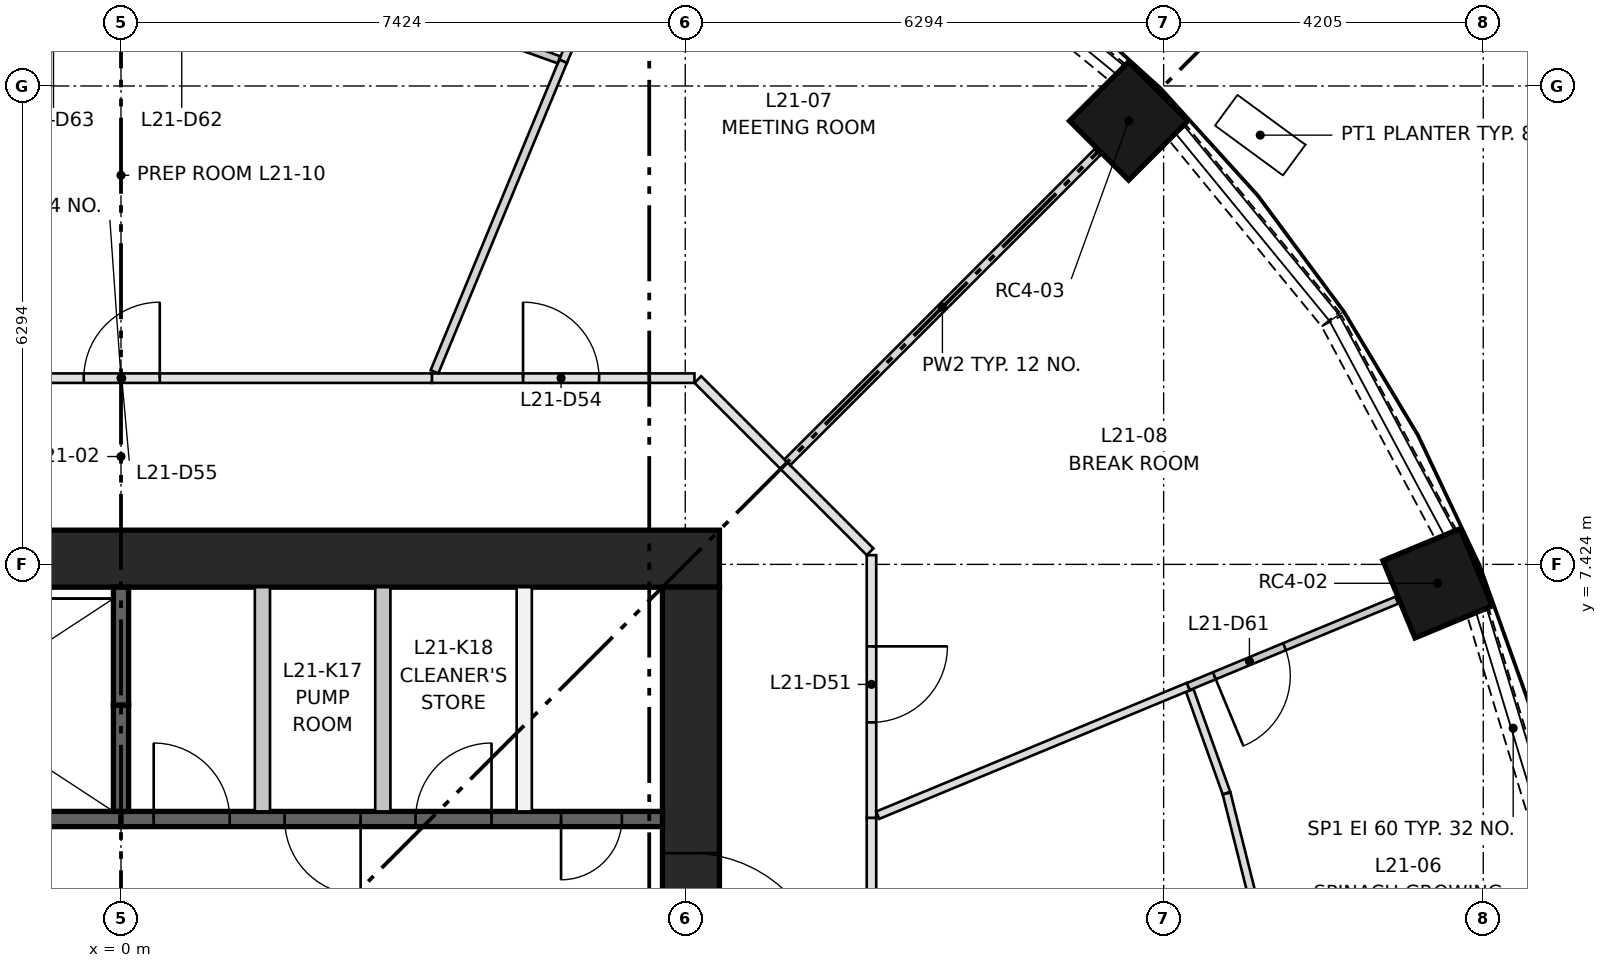
"""IFC4 building model, lengths in metres.
Left out: names, types, materials, properties, quantities, classifications, styles, units other than length and angle.
Written with IfcOpenShell. Run it as: python <this file> out.ifc"""

import sys

from ifc_helpers import new_model, si_unit, direction, frame, frame_2d, origin, origin_2d, place, context, subcontext, project, spatial, rectangle, extrude, element, fill, save


model = new_model("IFC4")
c1 = context("Model", 3, precision=1e-05, world=origin(), true_north=direction((0.0, 1.0)))
c2 = subcontext(c1, "Body", "Model", "MODEL_VIEW")
j1 = project(units=[si_unit("LENGTHUNIT", "METRE"), si_unit("PLANEANGLEUNIT", "RADIAN")], contexts=[c1])
p1 = place(None, origin())
s1 = spatial("IfcSite", under=j1, at=p1, CompositionType="ELEMENT")
p2 = place(p1, origin())
s2 = spatial("IfcBuilding", under=s1, at=p2, CompositionType="ELEMENT")
p3 = place(p2, frame((0.0, 0.0, 83.7)))
s3 = spatial("IfcBuildingStorey", under=s2, at=p3, CompositionType="ELEMENT", Elevation=83.7)
for number, where, z_axis, x_axis in (
    (1, (17.323, 7.175, 0.0), (0.0, 0.0, 1.0), (0.924, 0.383, 0.0)),
    (2, (13.258, 13.258, 0.0), (0.0, 0.0, 1.0), (0.707, 0.707, 0.0)),
):
    element("IfcColumn", number, at=place(p3, frame(where, z_axis=z_axis, x_axis=x_axis)), inside=s3, PredefinedType="COLUMN", context=c2, shape_type="SweptSolid", body=[
        extrude(rectangle(XDim=1.1, YDim=1.1, at=origin_2d()), origin(), (0.0, 0.0, 1.0), 3.65),
    ])
p4 = place(p3, frame((-7.874, 7.499, 0.0), z_axis=(0.0, 0.0, 1.0), x_axis=(1.0, 0.0, 0.0)))
e3 = element("IfcWall", 3, at=p4, inside=s3, PredefinedType="SHEAR", context=c2, shape_type="SweptSolid", body=[
    extrude(rectangle(XDim=15.748, YDim=0.75, at=frame_2d((7.874, 0.0))), origin(), (0.0, 0.0, 1.0), 3.65),
])
p5 = place(p3, frame((7.499, -7.124, 0.0), z_axis=(0.0, 0.0, 1.0), x_axis=(0.0, 1.0, 0.0)))
e4 = element("IfcWall", 4, at=p5, inside=s3, PredefinedType="SHEAR", context=c2, shape_type="SweptSolid", body=[
    extrude(rectangle(XDim=14.248, YDim=0.75, at=frame_2d((7.124, 0.0))), origin(), (0.0, 0.0, 1.0), 3.65),
])
p6 = place(p5, frame((6.624, 0.0, 0.0)))
e5 = element("IfcOpeningElement", 5, at=p6, cuts=e4, PredefinedType="OPENING", context=c2, shape_type="SweptSolid", body=[
    extrude(rectangle(XDim=1.0, YDim=2.1, at=frame_2d((0.5, 1.05))), frame((0.0, 0.385, 0.0), z_axis=(0.0, -1.0, 0.0), x_axis=(1.0, 0.0, 0.0)), (0.0, 0.0, 1.0), 0.77),
])
p7 = place(p5, frame((3.5, 0.0, 0.0)))
e6 = element("IfcOpeningElement", 6, at=p7, cuts=e4, PredefinedType="OPENING", context=c2, shape_type="SweptSolid", body=[
    extrude(rectangle(XDim=1.8, YDim=2.1, at=frame_2d((0.9, 1.05))), frame((0.0, 0.385, 0.0), z_axis=(0.0, -1.0, 0.0), x_axis=(1.0, 0.0, 0.0)), (0.0, 0.0, 1.0), 0.77),
])
p8 = place(p5, frame((8.948, 0.0, 0.0)))
e7 = element("IfcOpeningElement", 7, at=p8, cuts=e4, PredefinedType="OPENING", context=c2, shape_type="SweptSolid", body=[
    extrude(rectangle(XDim=1.8, YDim=2.1, at=frame_2d((0.9, 1.05))), frame((0.0, 0.385, 0.0), z_axis=(0.0, -1.0, 0.0), x_axis=(1.0, 0.0, 0.0)), (0.0, 0.0, 1.0), 0.77),
])
p9 = place(p3, frame((-7.124, 4.074, 0.0), z_axis=(0.0, 0.0, 1.0), x_axis=(1.0, 0.0, 0.0)))
e8 = element("IfcWall", 8, at=p9, inside=s3, PredefinedType="SHEAR", context=c2, shape_type="SweptSolid", body=[
    extrude(rectangle(XDim=7.124, YDim=0.2, at=frame_2d((3.562, 0.0))), origin(), (0.0, 0.0, 1.0), 3.3),
])
p10 = place(p3, frame((0.0, 4.074, 0.0), z_axis=(0.0, 0.0, 1.0), x_axis=(1.0, 0.0, 0.0)))
e9 = element("IfcWall", 9, at=p10, inside=s3, PredefinedType="SHEAR", context=c2, shape_type="SweptSolid", body=[
    extrude(rectangle(XDim=7.124, YDim=0.2, at=frame_2d((3.562, 0.0))), origin(), (0.0, 0.0, 1.0), 3.3),
])
p11 = place(p10, frame((0.43, 0.0, 0.0)))
e10 = element("IfcOpeningElement", 10, at=p11, cuts=e9, PredefinedType="OPENING", context=c2, shape_type="SweptSolid", body=[
    extrude(rectangle(XDim=1.0, YDim=2.1, at=frame_2d((0.5, 1.05))), frame((0.0, 0.11, 0.0), z_axis=(0.0, -1.0, 0.0), x_axis=(1.0, 0.0, 0.0)), (0.0, 0.0, 1.0), 0.22),
])
p12 = place(p10, frame((2.153, 0.0, 0.0)))
e11 = element("IfcOpeningElement", 11, at=p12, cuts=e9, PredefinedType="OPENING", context=c2, shape_type="SweptSolid", body=[
    extrude(rectangle(XDim=1.0, YDim=2.1, at=frame_2d((0.5, 1.05))), frame((0.0, 0.11, 0.0), z_axis=(0.0, -1.0, 0.0), x_axis=(1.0, 0.0, 0.0)), (0.0, 0.0, 1.0), 0.22),
])
p13 = place(p10, frame((3.875, 0.0, 0.0)))
e12 = element("IfcOpeningElement", 12, at=p13, cuts=e9, PredefinedType="OPENING", context=c2, shape_type="SweptSolid", body=[
    extrude(rectangle(XDim=1.0, YDim=2.1, at=frame_2d((0.5, 1.05))), frame((0.0, 0.11, 0.0), z_axis=(0.0, -1.0, 0.0), x_axis=(1.0, 0.0, 0.0)), (0.0, 0.0, 1.0), 0.22),
])
p14 = place(p10, frame((5.79, 0.0, 0.0)))
e13 = element("IfcOpeningElement", 13, at=p14, cuts=e9, PredefinedType="OPENING", context=c2, shape_type="SweptSolid", body=[
    extrude(rectangle(XDim=0.8, YDim=2.1, at=frame_2d((0.4, 1.05))), frame((0.0, 0.11, 0.0), z_axis=(0.0, -1.0, 0.0), x_axis=(1.0, 0.0, 0.0)), (0.0, 0.0, 1.0), 0.22),
])
p15 = place(p3, frame((0.0, 4.174, 0.0), z_axis=(0.0, 0.0, 1.0), x_axis=(0.0, 1.0, 0.0)))
e14 = element("IfcWall", 14, at=p15, inside=s3, PredefinedType="SHEAR", context=c2, shape_type="SweptSolid", body=[
    extrude(rectangle(XDim=1.4, YDim=0.2, at=frame_2d((0.7, 0.0))), origin(), (0.0, 0.0, 1.0), 3.3),
])
p16 = place(p3, frame((0.0, 5.574, 0.0), z_axis=(0.0, 0.0, 1.0), x_axis=(0.0, 1.0, 0.0)))
e15 = element("IfcWall", 15, at=p16, inside=s3, PredefinedType="SHEAR", context=c2, shape_type="SweptSolid", body=[
    extrude(rectangle(XDim=1.55, YDim=0.2, at=frame_2d((0.775, 0.0))), origin(), (0.0, 0.0, 1.0), 3.3),
])
for number, where, z_axis, x_axis in (
    (16, (1.861, 4.174, 0.0), (0.0, 0.0, 1.0), (0.0, 1.0, 0.0)),
    (17, (3.445, 4.174, 0.0), (0.0, 0.0, 1.0), (0.0, 1.0, 0.0)),
    (18, (5.305, 4.174, 0.0), (0.0, 0.0, 1.0), (0.0, 1.0, 0.0)),
):
    element("IfcWall", number, at=place(p3, frame(where, z_axis=z_axis, x_axis=x_axis)), inside=s3, PredefinedType="PARTITIONING", context=c2, shape_type="SweptSolid", body=[
        extrude(rectangle(XDim=2.95, YDim=0.2, at=frame_2d((1.475, 0.0))), origin(), (0.0, 0.0, 1.0), 3.3),
    ])
p17 = place(p3, frame((18.778, 3.75, 0.0), z_axis=(0.0, 0.0, 1.0), x_axis=(-0.290325591482, 0.956927923582, 0.0)))
e19 = element("IfcWall", 19, at=p17, inside=s3, PredefinedType="SOLIDWALL", context=c2, shape_type="SweptSolid", body=[
    extrude(rectangle(XDim=3.173, YDim=0.3, at=frame_2d((1.586, 0.0))), origin(), (0.0, 0.0, 1.0), 0.9),
])
p18 = place(p3, frame((17.425, 7.828, 0.0), z_axis=(0.0, 0.0, 1.0), x_axis=(-0.471458802606, 0.88188808669, 0.0)))
e20 = element("IfcWall", 20, at=p18, inside=s3, PredefinedType="SOLIDWALL", context=c2, shape_type="SweptSolid", body=[
    extrude(rectangle(XDim=3.172, YDim=0.3, at=frame_2d((1.586, 0.0))), origin(), (0.0, 0.0, 1.0), 0.9),
])
for number, where, z_axis, x_axis in (
    (21, (15.913, 10.651, 0.0), (0.0, 0.0, 1.0), (-0.634, 0.773, 0.0)),
    (22, (13.104, 13.9, 0.0), (0.0, 0.0, 1.0), (-0.773, 0.634, 0.0)),
):
    element("IfcWall", number, at=place(p3, frame(where, z_axis=z_axis, x_axis=x_axis)), inside=s3, PredefinedType="SOLIDWALL", context=c2, shape_type="SweptSolid", body=[
        extrude(rectangle(XDim=3.173, YDim=0.3, at=frame_2d((1.586, 0.0))), origin(), (0.0, 0.0, 1.0), 0.9),
    ])
p19 = place(p3, frame((9.874, 4.09, 0.0), z_axis=(0.0, 0.0, 1.0), x_axis=(0.0, -1.0, 0.0)))
e23 = element("IfcWall", 23, at=p19, inside=s3, PredefinedType="PARTITIONING", context=c2, shape_type="SweptSolid", body=[
    extrude(rectangle(XDim=4.09, YDim=0.125, at=frame_2d((2.045, 0.0))), origin(), (0.0, 0.0, 1.0), 3.3),
])
p20 = place(p19, frame((1.5, 0.0, 0.0)))
e24 = element("IfcOpeningElement", 24, at=p20, cuts=e23, PredefinedType="OPENING", context=c2, shape_type="SweptSolid", body=[
    extrude(rectangle(XDim=1.0, YDim=2.1, at=frame_2d((0.5, 1.05))), frame((0.0, 0.073, 0.0), z_axis=(0.0, -1.0, 0.0), x_axis=(1.0, 0.0, 0.0)), (0.0, 0.0, 1.0), 0.145),
])
p21 = place(p3, frame((8.722, 8.722, 0.0), z_axis=(0.0, 0.0, 1.0), x_axis=(0.70718294931, -0.707030604857, 0.0)))
e25 = element("IfcWall", 25, at=p21, inside=s3, PredefinedType="PARTITIONING", context=c2, shape_type="SweptSolid", body=[
    extrude(rectangle(XDim=1.603, YDim=0.125, at=frame_2d((0.801, 0.0))), origin(), (0.0, 0.0, 1.0), 3.3),
])
p22 = place(p3, frame((9.874, 7.545, 0.0), z_axis=(0.0, 0.0, 1.0), x_axis=(0.0, -1.0, 0.0)))
e26 = element("IfcWall", 26, at=p22, inside=s3, PredefinedType="PARTITIONING", context=c2, shape_type="SweptSolid", body=[
    extrude(rectangle(XDim=3.455, YDim=0.125, at=frame_2d((1.728, 0.0))), origin(), (0.0, 0.0, 1.0), 3.3),
])
p23 = place(p22, frame((1.2, 0.0, 0.0)))
e27 = element("IfcOpeningElement", 27, at=p23, cuts=e26, PredefinedType="OPENING", context=c2, shape_type="SweptSolid", body=[
    extrude(rectangle(XDim=1.0, YDim=2.1, at=frame_2d((0.5, 1.05))), frame((0.0, 0.073, 0.0), z_axis=(0.0, -1.0, 0.0), x_axis=(1.0, 0.0, 0.0)), (0.0, 0.0, 1.0), 0.145),
])
p24 = place(p3, frame((4.09, 9.874, 0.0), z_axis=(0.0, 0.0, 1.0), x_axis=(1.0, 0.0, 0.0)))
e28 = element("IfcWall", 28, at=p24, inside=s3, PredefinedType="PARTITIONING", context=c2, shape_type="SweptSolid", body=[
    extrude(rectangle(XDim=3.455, YDim=0.125, at=frame_2d((1.728, 0.0))), origin(), (0.0, 0.0, 1.0), 3.3),
])
p25 = place(p24, frame((1.2, 0.0, 0.0)))
e29 = element("IfcOpeningElement", 29, at=p25, cuts=e28, PredefinedType="OPENING", context=c2, shape_type="SweptSolid", body=[
    extrude(rectangle(XDim=1.0, YDim=2.1, at=frame_2d((0.5, 1.05))), frame((0.0, 0.073, 0.0), z_axis=(0.0, -1.0, 0.0), x_axis=(1.0, 0.0, 0.0)), (0.0, 0.0, 1.0), 0.145),
])
p26 = place(p3, frame((7.589, 9.856, 0.0), z_axis=(0.0, 0.0, 1.0), x_axis=(0.707030604857, -0.70718294931, 0.0)))
e30 = element("IfcWall", 30, at=p26, inside=s3, PredefinedType="PARTITIONING", context=c2, shape_type="SweptSolid", body=[
    extrude(rectangle(XDim=1.603, YDim=0.125, at=frame_2d((0.801, 0.0))), origin(), (0.0, 0.0, 1.0), 3.3),
])
p27 = place(p3, frame((-4.09, 9.874, 0.0), z_axis=(0.0, 0.0, 1.0), x_axis=(1.0, 0.0, 0.0)))
e31 = element("IfcWall", 31, at=p27, inside=s3, PredefinedType="PARTITIONING", context=c2, shape_type="SweptSolid", body=[
    extrude(rectangle(XDim=8.18, YDim=0.125, at=frame_2d((4.09, 0.0))), origin(), (0.0, 0.0, 1.0), 3.3),
])
p28 = place(p27, frame((3.6, 0.0, 0.0)))
e32 = element("IfcOpeningElement", 32, at=p28, cuts=e31, PredefinedType="OPENING", context=c2, shape_type="SweptSolid", body=[
    extrude(rectangle(XDim=1.0, YDim=2.1, at=frame_2d((0.5, 1.05))), frame((0.0, 0.073, 0.0), z_axis=(0.0, -1.0, 0.0), x_axis=(1.0, 0.0, 0.0)), (0.0, 0.0, 1.0), 0.145),
])
p29 = place(p3, frame((14.062, 5.765, 0.0), z_axis=(0.0, 0.0, 1.0), x_axis=(0.336940319535, -0.941526006583, 0.0)))
e33 = element("IfcWall", 33, at=p29, inside=s3, PredefinedType="PARTITIONING", context=c2, shape_type="SweptSolid", body=[
    extrude(rectangle(XDim=1.434, YDim=0.105, at=frame_2d((0.717, 0.0))), origin(), (0.0, 0.0, 1.0), 3.3),
])
p30 = place(p3, frame((14.546, 4.41, 0.0), z_axis=(0.0, 0.0, 1.0), x_axis=(0.242922070527, -0.970045806986, 0.0)))
e34 = element("IfcWall", 34, at=p30, inside=s3, PredefinedType="PARTITIONING", context=c2, shape_type="SweptSolid", body=[
    extrude(rectangle(XDim=1.486, YDim=0.105, at=frame_2d((0.743, 0.0))), origin(), (0.0, 0.0, 1.0), 3.3),
])
p31 = place(p3, frame((9.957, 4.124, 0.0), z_axis=(0.0, 0.0, 1.0), x_axis=(0.923862097388, 0.382725521764, 0.0)))
e35 = element("IfcWall", 35, at=p31, inside=s3, PredefinedType="PARTITIONING", context=c2, shape_type="SweptSolid", body=[
    extrude(rectangle(XDim=4.423, YDim=0.105, at=frame_2d((2.211, 0.0))), origin(), (0.0, 0.0, 1.0), 3.3),
])
p32 = place(p3, frame((16.787, 6.953, 0.0), z_axis=(0.0, 0.0, 1.0), x_axis=(-0.923889594764, -0.382659139036, 0.0)))
e36 = element("IfcWall", 36, at=p32, inside=s3, PredefinedType="PARTITIONING", context=c2, shape_type="SweptSolid", body=[
    extrude(rectangle(XDim=2.97, YDim=0.1, at=frame_2d((1.485, 0.0))), origin(), (0.0, 0.0, 1.0), 3.3),
])
p33 = place(p32, frame((1.6, 0.0, 0.0)))
e37 = element("IfcOpeningElement", 37, at=p33, cuts=e36, PredefinedType="OPENING", context=c2, shape_type="SweptSolid", body=[
    extrude(rectangle(XDim=1.0, YDim=2.1, at=frame_2d((0.5, 1.05))), frame((0.0, 0.06, 0.0), z_axis=(0.0, -1.0, 0.0), x_axis=(1.0, 0.0, 0.0)), (0.0, 0.0, 1.0), 0.12),
])
p34 = place(p3, frame((12.848, 12.848, 0.0), z_axis=(0.0, 0.0, 1.0), x_axis=(-0.707106781187, -0.707106781187, 0.0)))
e38 = element("IfcWall", 38, at=p34, inside=s3, PredefinedType="PARTITIONING", context=c2, shape_type="SweptSolid", body=[
    extrude(rectangle(XDim=5.772, YDim=0.11, at=frame_2d((2.886, 0.0))), origin(), (0.0, 0.0, 1.0), 3.3),
])
p35 = place(p3, frame((5.817, 14.043, 0.0), z_axis=(0.0, 0.0, 1.0), x_axis=(0.382659139036, 0.923889594764, 0.0)))
e39 = element("IfcWall", 39, at=p35, inside=s3, PredefinedType="PARTITIONING", context=c2, shape_type="SweptSolid", body=[
    extrude(rectangle(XDim=2.97, YDim=0.11, at=frame_2d((1.485, 0.0))), origin(), (0.0, 0.0, 1.0), 3.3),
])
p36 = place(p3, frame((4.125, 9.958, 0.0), z_axis=(0.0, 0.0, 1.0), x_axis=(0.382709362011, 0.923868791674, 0.0)))
e40 = element("IfcWall", 40, at=p36, inside=s3, PredefinedType="PARTITIONING", context=c2, shape_type="SweptSolid", body=[
    extrude(rectangle(XDim=4.422, YDim=0.11, at=frame_2d((2.211, 0.0))), origin(), (0.0, 0.0, 1.0), 3.3),
])
p37 = place(p3, frame((5.763, 14.062, 0.0), z_axis=(0.0, 0.0, 1.0), x_axis=(-0.941587499657, 0.33676843749, 0.0)))
e41 = element("IfcWall", 41, at=p37, inside=s3, PredefinedType="PARTITIONING", context=c2, shape_type="SweptSolid", body=[
    extrude(rectangle(XDim=1.432, YDim=0.1, at=frame_2d((0.716, 0.0))), origin(), (0.0, 0.0, 1.0), 3.3),
])
p38 = place(p11, origin())
e42 = element("IfcDoor", 42, at=p38, inside=s3, OperationType="SINGLE_SWING_LEFT", PredefinedType="DOOR", context=c2, shape_type="SweptSolid", body=[
    extrude(rectangle(XDim=1.0, YDim=2.1, at=frame_2d((0.5, 1.05))), frame((0.0, 0.025, 0.0), z_axis=(0.0, -1.0, 0.0), x_axis=(1.0, 0.0, 0.0)), (0.0, 0.0, 1.0), 0.05),
])
fill(e10, e42)
p39 = place(p12, frame((1.0, 0.0, 0.0), z_axis=(0.0, 0.0, 1.0), x_axis=(-1.0, 0.0, 0.0)))
e43 = element("IfcDoor", 43, at=p39, inside=s3, OperationType="SINGLE_SWING_RIGHT", PredefinedType="DOOR", context=c2, shape_type="SweptSolid", body=[
    extrude(rectangle(XDim=1.0, YDim=2.1, at=frame_2d((0.5, 1.05))), frame((0.0, 0.025, 0.0), z_axis=(0.0, -1.0, 0.0), x_axis=(1.0, 0.0, 0.0)), (0.0, 0.0, 1.0), 0.05),
])
fill(e11, e43)
p40 = place(p13, origin())
e44 = element("IfcDoor", 44, at=p40, inside=s3, OperationType="SINGLE_SWING_RIGHT", PredefinedType="DOOR", context=c2, shape_type="SweptSolid", body=[
    extrude(rectangle(XDim=1.0, YDim=2.1, at=frame_2d((0.5, 1.05))), frame((0.0, 0.025, 0.0), z_axis=(0.0, -1.0, 0.0), x_axis=(1.0, 0.0, 0.0)), (0.0, 0.0, 1.0), 0.05),
])
fill(e12, e44)
p41 = place(p14, frame((0.8, 0.0, 0.0), z_axis=(0.0, 0.0, 1.0), x_axis=(-1.0, 0.0, 0.0)))
e45 = element("IfcDoor", 45, at=p41, inside=s3, OperationType="SINGLE_SWING_LEFT", PredefinedType="DOOR", context=c2, shape_type="SweptSolid", body=[
    extrude(rectangle(XDim=0.8, YDim=2.1, at=frame_2d((0.4, 1.05))), frame((0.0, 0.025, 0.0), z_axis=(0.0, -1.0, 0.0), x_axis=(1.0, 0.0, 0.0)), (0.0, 0.0, 1.0), 0.05),
])
fill(e13, e45)
p42 = place(p8, frame((1.8, 0.0, 0.0), z_axis=(0.0, 0.0, 1.0), x_axis=(-1.0, 0.0, 0.0)))
e46 = element("IfcDoor", 46, at=p42, inside=s3, OperationType="DOUBLE_DOOR_SINGLE_SWING", PredefinedType="DOOR", context=c2, shape_type="SweptSolid", body=[
    extrude(rectangle(XDim=1.8, YDim=2.1, at=frame_2d((0.9, 1.05))), frame((0.0, 0.025, 0.0), z_axis=(0.0, -1.0, 0.0), x_axis=(1.0, 0.0, 0.0)), (0.0, 0.0, 1.0), 0.05),
])
fill(e7, e46)
p43 = place(p23, origin())
e47 = element("IfcDoor", 47, at=p43, inside=s3, OperationType="SINGLE_SWING_LEFT", PredefinedType="DOOR", context=c2, shape_type="SweptSolid", body=[
    extrude(rectangle(XDim=1.0, YDim=2.1, at=frame_2d((0.5, 1.05))), frame((0.0, 0.025, 0.0), z_axis=(0.0, -1.0, 0.0), x_axis=(1.0, 0.0, 0.0)), (0.0, 0.0, 1.0), 0.05),
])
fill(e27, e47)
p44 = place(p25, origin())
e48 = element("IfcDoor", 48, at=p44, inside=s3, OperationType="SINGLE_SWING_LEFT", PredefinedType="DOOR", context=c2, shape_type="SweptSolid", body=[
    extrude(rectangle(XDim=1.0, YDim=2.1, at=frame_2d((0.5, 1.05))), frame((0.0, 0.025, 0.0), z_axis=(0.0, -1.0, 0.0), x_axis=(1.0, 0.0, 0.0)), (0.0, 0.0, 1.0), 0.05),
])
fill(e29, e48)
p45 = place(p28, origin())
e49 = element("IfcDoor", 49, at=p45, inside=s3, OperationType="SINGLE_SWING_RIGHT", PredefinedType="DOOR", context=c2, shape_type="SweptSolid", body=[
    extrude(rectangle(XDim=1.0, YDim=2.1, at=frame_2d((0.5, 1.05))), frame((0.0, 0.025, 0.0), z_axis=(0.0, -1.0, 0.0), x_axis=(1.0, 0.0, 0.0)), (0.0, 0.0, 1.0), 0.05),
])
fill(e32, e49)
p46 = place(p33, origin())
e50 = element("IfcDoor", 50, at=p46, inside=s3, OperationType="SINGLE_SWING_RIGHT", PredefinedType="DOOR", context=c2, shape_type="SweptSolid", body=[
    extrude(rectangle(XDim=1.0, YDim=2.1, at=frame_2d((0.5, 1.05))), frame((0.0, 0.025, 0.0), z_axis=(0.0, -1.0, 0.0), x_axis=(1.0, 0.0, 0.0)), (0.0, 0.0, 1.0), 0.05),
])
fill(e37, e50)
save(model, sys.argv[1])
